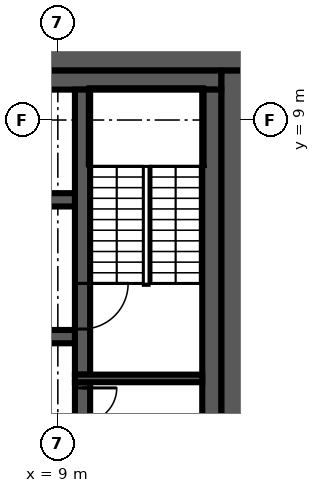
"""IFC4 building model, lengths in metres.
Left out: names, types, materials, properties, quantities, classifications, styles, units other than length and angle.
Written with IfcOpenShell. Run it as: python <this file> out.ifc"""

import sys

from ifc_helpers import new_model, si_unit, direction, frame, frame_2d, origin, place, context, subcontext, project, spatial, rectangle, extrude, element, fill, save


model = new_model("IFC4")
c1 = context("Model", 3, precision=1e-05, world=origin(), true_north=direction((0.0, 1.0)))
c2 = subcontext(c1, "Body", "Model", "MODEL_VIEW")
j1 = project(units=[si_unit("LENGTHUNIT", "METRE"), si_unit("PLANEANGLEUNIT", "RADIAN")], contexts=[c1])
p1 = place(None, origin())
s1 = spatial("IfcSite", under=j1, at=p1, CompositionType="ELEMENT")
p2 = place(p1, origin())
s2 = spatial("IfcBuilding", under=s1, at=p2, CompositionType="ELEMENT")
p3 = place(p2, frame((0.0, 0.0, 262.2)))
s3 = spatial("IfcBuildingStorey", under=s2, at=p3, CompositionType="ELEMENT", Elevation=262.2)
p4 = place(p3, frame((-14.0, 10.65, 0.0), z_axis=(0.0, 0.0, 1.0), x_axis=(1.0, 0.0, 0.0)))
e1 = element("IfcWall", 1, at=p4, inside=s3, PredefinedType="SHEAR", context=c2, shape_type="SweptSolid", body=[
    extrude(rectangle(XDim=28.0, YDim=0.7, at=frame_2d((14.0, 0.0))), origin(), (0.0, 0.0, 1.0), 3.82),
])
p5 = place(p4, frame((15.9, 0.0, 0.0)))
e2 = element("IfcOpeningElement", 2, at=p5, cuts=e1, PredefinedType="OPENING", context=c2, shape_type="SweptSolid", body=[
    extrude(rectangle(XDim=1.6, YDim=2.1, at=frame_2d((0.8, 1.05))), frame((0.0, 0.36, 0.0), z_axis=(0.0, -1.0, 0.0), x_axis=(1.0, 0.0, 0.0)), (0.0, 0.0, 1.0), 0.72),
])
p6 = place(p3, frame((13.65, 10.3, 0.0), z_axis=(0.0, 0.0, 1.0), x_axis=(0.0, -1.0, 0.0)))
e3 = element("IfcWall", 3, at=p6, inside=s3, PredefinedType="SHEAR", context=c2, shape_type="SweptSolid", body=[
    extrude(rectangle(XDim=20.6, YDim=0.7, at=frame_2d((10.3, 0.0))), origin(), (0.0, 0.0, 1.0), 3.82),
])
p7 = place(p3, frame((3.9, 10.05, 0.0), z_axis=(0.0, 0.0, 1.0), x_axis=(1.0, 0.0, 0.0)))
e4 = element("IfcWall", 4, at=p7, inside=s3, PredefinedType="SHEAR", context=c2, shape_type="SweptSolid", body=[
    extrude(rectangle(XDim=9.4, YDim=0.5, at=frame_2d((4.7, 0.0))), origin(), (0.0, 0.0, 1.0), 3.82),
])
p8 = place(p3, frame((13.05, 9.8, 0.0), z_axis=(0.0, 0.0, 1.0), x_axis=(0.0, -1.0, 0.0)))
e5 = element("IfcWall", 5, at=p8, inside=s3, PredefinedType="SHEAR", context=c2, shape_type="SweptSolid", body=[
    extrude(rectangle(XDim=19.6, YDim=0.5, at=frame_2d((9.8, 0.0))), origin(), (0.0, 0.0, 1.0), 3.82),
])
p9 = place(p3, frame((9.65, 2.1, 0.0), z_axis=(0.0, 0.0, 1.0), x_axis=(0.0, -1.0, 0.0)))
e6 = element("IfcWall", 6, at=p9, inside=s3, PredefinedType="SHEAR", context=c2, shape_type="SweptSolid", body=[
    extrude(rectangle(XDim=4.2, YDim=0.4, at=frame_2d((2.1, 0.0))), origin(), (0.0, 0.0, 1.0), 3.82),
])
p10 = place(p9, frame((0.15, 0.0, 0.0)))
e7 = element("IfcOpeningElement", 7, at=p10, cuts=e6, PredefinedType="OPENING", context=c2, shape_type="SweptSolid", body=[
    extrude(rectangle(XDim=0.9, YDim=2.1, at=frame_2d((0.45, 1.05))), frame((0.0, 0.21, 0.0), z_axis=(0.0, -1.0, 0.0), x_axis=(1.0, 0.0, 0.0)), (0.0, 0.0, 1.0), 0.42),
])
p11 = place(p3, frame((9.65, 9.8, 0.0), z_axis=(0.0, 0.0, 1.0), x_axis=(0.0, -1.0, 0.0)))
e8 = element("IfcWall", 8, at=p11, inside=s3, PredefinedType="SHEAR", context=c2, shape_type="SweptSolid", body=[
    extrude(rectangle(XDim=7.5, YDim=0.4, at=frame_2d((3.75, 0.0))), origin(), (0.0, 0.0, 1.0), 3.82),
])
p12 = place(p11, frame((5.1, 0.0, 0.0)))
e9 = element("IfcOpeningElement", 9, at=p12, cuts=e8, PredefinedType="OPENING", context=c2, shape_type="SweptSolid", body=[
    extrude(rectangle(XDim=1.2, YDim=2.1, at=frame_2d((0.6, 1.05))), frame((0.0, 0.21, 0.0), z_axis=(0.0, -1.0, 0.0), x_axis=(1.0, 0.0, 0.0)), (0.0, 0.0, 1.0), 0.42),
])
p13 = place(p3, frame((9.45, 2.2, 0.0), z_axis=(0.0, 0.0, 1.0), x_axis=(1.0, 0.0, 0.0)))
e10 = element("IfcWall", 10, at=p13, inside=s3, PredefinedType="SHEAR", context=c2, shape_type="SweptSolid", body=[
    extrude(rectangle(XDim=3.35, YDim=0.2, at=frame_2d((1.675, 0.0))), origin(), (0.0, 0.0, 1.0), 3.82),
])
p14 = place(p3, frame((-9.45, 6.9, 0.0), z_axis=(0.0, 0.0, 1.0), x_axis=(1.0, 0.0, 0.0)))
e11 = element("IfcWall", 11, at=p14, inside=s3, PredefinedType="SHEAR", context=c2, shape_type="SweptSolid", body=[
    extrude(rectangle(XDim=18.9, YDim=0.35, at=frame_2d((9.45, 0.0))), origin(), (0.0, 0.0, 1.0), 3.82),
])
p15 = place(p14, frame((11.55, 0.0, 0.0)))
e12 = element("IfcOpeningElement", 12, at=p15, cuts=e11, PredefinedType="OPENING", context=c2, shape_type="SweptSolid", body=[
    extrude(rectangle(XDim=1.2, YDim=2.1, at=frame_2d((0.6, 1.05))), frame((0.0, 0.185, 0.0), z_axis=(0.0, -1.0, 0.0), x_axis=(1.0, 0.0, 0.0)), (0.0, 0.0, 1.0), 0.37),
])
p16 = place(p14, frame((14.3, 0.0, 0.0)))
e13 = element("IfcOpeningElement", 13, at=p16, cuts=e11, PredefinedType="OPENING", context=c2, shape_type="SweptSolid", body=[
    extrude(rectangle(XDim=1.1, YDim=2.1, at=frame_2d((0.55, 1.05))), frame((0.0, 0.185, 0.0), z_axis=(0.0, -1.0, 0.0), x_axis=(1.0, 0.0, 0.0)), (0.0, 0.0, 1.0), 0.37),
])
p17 = place(p14, frame((17.0, 0.0, 0.0)))
e14 = element("IfcOpeningElement", 14, at=p17, cuts=e11, PredefinedType="OPENING", context=c2, shape_type="SweptSolid", body=[
    extrude(rectangle(XDim=1.1, YDim=2.1, at=frame_2d((0.55, 1.05))), frame((0.0, 0.185, 0.0), z_axis=(0.0, -1.0, 0.0), x_axis=(1.0, 0.0, 0.0)), (0.0, 0.0, 1.0), 0.37),
])
p18 = place(p14, frame((0.9, 0.0, 0.0)))
e15 = element("IfcOpeningElement", 15, at=p18, cuts=e11, PredefinedType="OPENING", context=c2, shape_type="SweptSolid", body=[
    extrude(rectangle(XDim=0.9, YDim=2.1, at=frame_2d((0.45, 1.05))), frame((0.0, 0.185, 0.0), z_axis=(0.0, -1.0, 0.0), x_axis=(1.0, 0.0, 0.0)), (0.0, 0.0, 1.0), 0.37),
])
p19 = place(p14, frame((6.3, 0.0, 0.0)))
e16 = element("IfcOpeningElement", 16, at=p19, cuts=e11, PredefinedType="OPENING", context=c2, shape_type="SweptSolid", body=[
    extrude(rectangle(XDim=0.9, YDim=2.1, at=frame_2d((0.45, 1.05))), frame((0.0, 0.185, 0.0), z_axis=(0.0, -1.0, 0.0), x_axis=(1.0, 0.0, 0.0)), (0.0, 0.0, 1.0), 0.37),
])
p20 = place(p3, frame((9.45, 3.3, 0.0), z_axis=(0.0, 0.0, 1.0), x_axis=(-1.0, 0.0, 0.0)))
e17 = element("IfcWall", 17, at=p20, inside=s3, PredefinedType="SHEAR", context=c2, shape_type="SweptSolid", body=[
    extrude(rectangle(XDim=18.9, YDim=0.35, at=frame_2d((9.45, 0.0))), origin(), (0.0, 0.0, 1.0), 3.82),
])
p21 = place(p20, frame((6.2, 0.0, 0.0)))
e18 = element("IfcOpeningElement", 18, at=p21, cuts=e17, PredefinedType="OPENING", context=c2, shape_type="SweptSolid", body=[
    extrude(rectangle(XDim=1.1, YDim=2.1, at=frame_2d((0.55, 1.05))), frame((0.0, 0.185, 0.0), z_axis=(0.0, -1.0, 0.0), x_axis=(1.0, 0.0, 0.0)), (0.0, 0.0, 1.0), 0.37),
])
p22 = place(p20, frame((3.5, 0.0, 0.0)))
e19 = element("IfcOpeningElement", 19, at=p22, cuts=e17, PredefinedType="OPENING", context=c2, shape_type="SweptSolid", body=[
    extrude(rectangle(XDim=1.1, YDim=2.1, at=frame_2d((0.55, 1.05))), frame((0.0, 0.185, 0.0), z_axis=(0.0, -1.0, 0.0), x_axis=(1.0, 0.0, 0.0)), (0.0, 0.0, 1.0), 0.37),
])
p23 = place(p20, frame((0.9, 0.0, 0.0)))
e20 = element("IfcOpeningElement", 20, at=p23, cuts=e17, PredefinedType="OPENING", context=c2, shape_type="SweptSolid", body=[
    extrude(rectangle(XDim=0.9, YDim=2.1, at=frame_2d((0.45, 1.05))), frame((0.0, 0.185, 0.0), z_axis=(0.0, -1.0, 0.0), x_axis=(1.0, 0.0, 0.0)), (0.0, 0.0, 1.0), 0.37),
])
p24 = place(p20, frame((14.4, 0.0, 0.0)))
e21 = element("IfcOpeningElement", 21, at=p24, cuts=e17, PredefinedType="OPENING", context=c2, shape_type="SweptSolid", body=[
    extrude(rectangle(XDim=0.9, YDim=2.1, at=frame_2d((0.45, 1.05))), frame((0.0, 0.185, 0.0), z_axis=(0.0, -1.0, 0.0), x_axis=(1.0, 0.0, 0.0)), (0.0, 0.0, 1.0), 0.37),
])
p25 = place(p20, frame((9.0, 0.0, 0.0)))
e22 = element("IfcOpeningElement", 22, at=p25, cuts=e17, PredefinedType="OPENING", context=c2, shape_type="SweptSolid", body=[
    extrude(rectangle(XDim=0.9, YDim=2.1, at=frame_2d((0.45, 1.05))), frame((0.0, 0.185, 0.0), z_axis=(0.0, -1.0, 0.0), x_axis=(1.0, 0.0, 0.0)), (0.0, 0.0, 1.0), 0.37),
])
p26 = place(p10, origin())
e23 = element("IfcDoor", 23, at=p26, inside=s3, OperationType="SINGLE_SWING_RIGHT", PredefinedType="DOOR", context=c2, shape_type="SweptSolid", body=[
    extrude(rectangle(XDim=0.9, YDim=2.1, at=frame_2d((0.45, 1.05))), frame((0.0, 0.025, 0.0), z_axis=(0.0, -1.0, 0.0), x_axis=(1.0, 0.0, 0.0)), (0.0, 0.0, 1.0), 0.05),
])
fill(e7, e23)
p27 = place(p12, origin())
e24 = element("IfcDoor", 24, at=p27, inside=s3, OperationType="SINGLE_SWING_LEFT", PredefinedType="DOOR", context=c2, shape_type="SweptSolid", body=[
    extrude(rectangle(XDim=1.2, YDim=2.1, at=frame_2d((0.6, 1.05))), frame((0.0, 0.025, 0.0), z_axis=(0.0, -1.0, 0.0), x_axis=(1.0, 0.0, 0.0)), (0.0, 0.0, 1.0), 0.05),
])
fill(e9, e24)
save(model, sys.argv[1])
